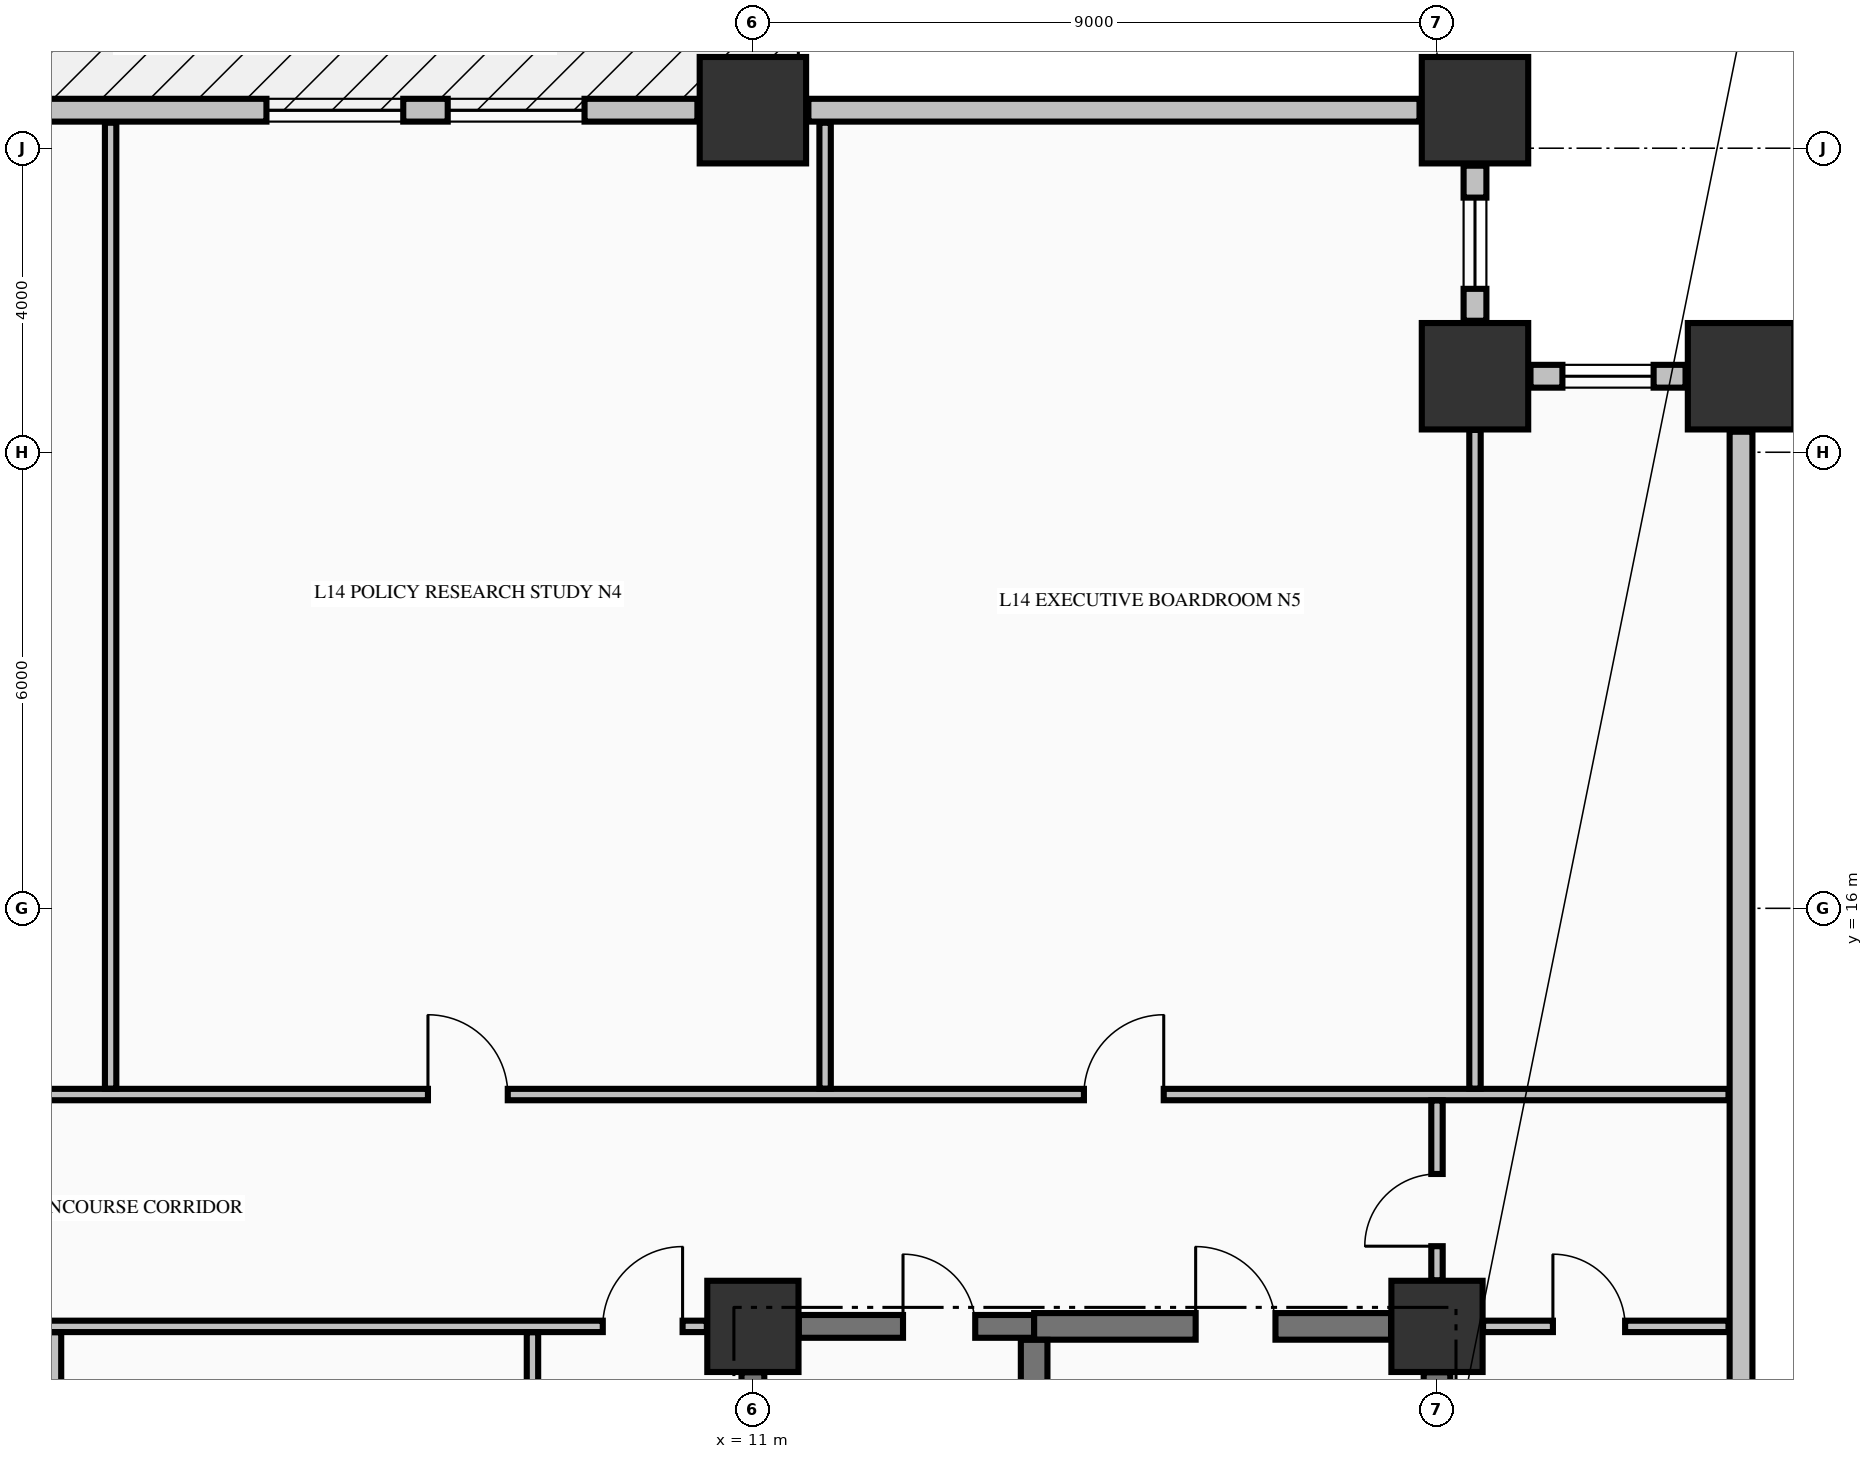
"""IFC4 building model, lengths in metres.
Left out: names, types, materials, properties, quantities, classifications, styles, units other than length and angle.
Written with IfcOpenShell. Run it as: python <this file> out.ifc"""

import sys

from ifc_helpers import new_model, si_unit, direction, frame, frame_2d, origin, origin_2d, place, context, subcontext, project, spatial, rectangle, extrude, element, fill, save


model = new_model("IFC4")
c1 = context("Model", 3, precision=1e-05, world=origin(), true_north=direction((0.0, 1.0)))
c2 = subcontext(c1, "Body", "Model", "MODEL_VIEW")
j1 = project(units=[si_unit("LENGTHUNIT", "METRE"), si_unit("PLANEANGLEUNIT", "RADIAN")], contexts=[c1])
p1 = place(None, origin())
s1 = spatial("IfcSite", under=j1, at=p1, CompositionType="ELEMENT")
p2 = place(p1, origin())
s2 = spatial("IfcBuilding", under=s1, at=p2, CompositionType="ELEMENT")
p3 = place(p2, frame((0.0, 0.0, 60.76)))
s3 = spatial("IfcBuildingStorey", under=s2, at=p3, CompositionType="ELEMENT", Elevation=60.76)
for number, where, z_axis, x_axis in (
    (1, (11.0, 26.5, -0.3), (0.0, 0.0, 1.0), (1.0, 0.0, 0.0)),
    (2, (20.5, 26.5, -0.3), (0.0, 0.0, 1.0), (1.0, 0.0, 0.0)),
    (3, (24.0, 23.0, -0.3), (0.0, 0.0, 1.0), (1.0, 0.0, 0.0)),
    (4, (20.5, 23.0, -0.3), (0.0, 0.0, 1.0), (1.0, 0.0, 0.0)),
):
    element("IfcColumn", number, at=place(p3, frame(where, z_axis=z_axis, x_axis=x_axis)), inside=s3, PredefinedType="COLUMN", context=c2, shape_type="SweptSolid", body=[
        extrude(rectangle(XDim=1.4, YDim=1.4, at=origin_2d()), origin(), (0.0, 0.0, 1.0), 3.62),
    ])
for number, where, z_axis, x_axis in (
    (5, (11.0, 10.5, -0.3), (0.0, 0.0, 1.0), (1.0, 0.0, 0.0)),
    (6, (20.0, 10.5, -0.3), (0.0, 0.0, 1.0), (1.0, 0.0, 0.0)),
):
    element("IfcColumn", number, at=place(p3, frame(where, z_axis=z_axis, x_axis=x_axis)), inside=s3, PredefinedType="COLUMN", context=c2, shape_type="SweptSolid", body=[
        extrude(rectangle(XDim=1.2, YDim=1.2, at=origin_2d()), origin(), (0.0, 0.0, 1.0), 3.62),
    ])
p4 = place(p3, frame((23.27, 23.0, 0.0), z_axis=(0.0, 0.0, 1.0), x_axis=(-1.0, 0.0, 0.0)))
e7 = element("IfcWall", 7, at=p4, inside=s3, PredefinedType="STANDARD", context=c2, shape_type="SweptSolid", body=[
    extrude(rectangle(XDim=2.04, YDim=0.3, at=frame_2d((1.02, 0.0))), origin(), (0.0, 0.0, 1.0), 2.712),
])
p5 = place(p4, frame((0.42, 0.0, 0.82)))
e8 = element("IfcOpeningElement", 8, at=p5, cuts=e7, PredefinedType="OPENING", context=c2, shape_type="SweptSolid", body=[
    extrude(rectangle(XDim=1.2, YDim=1.65, at=frame_2d((0.6, 0.825))), frame((0.0, 0.16, 0.0), z_axis=(0.0, -1.0, 0.0), x_axis=(1.0, 0.0, 0.0)), (0.0, 0.0, 1.0), 0.32),
])
p6 = place(p3, frame((20.5, 23.73, 0.0), z_axis=(0.0, 0.0, 1.0), x_axis=(0.0, 1.0, 0.0)))
e9 = element("IfcWall", 9, at=p6, inside=s3, PredefinedType="STANDARD", context=c2, shape_type="SweptSolid", body=[
    extrude(rectangle(XDim=2.04, YDim=0.3, at=frame_2d((1.02, 0.0))), origin(), (0.0, 0.0, 1.0), 2.712),
])
p7 = place(p6, frame((0.42, 0.0, 0.82)))
e10 = element("IfcOpeningElement", 10, at=p7, cuts=e9, PredefinedType="OPENING", context=c2, shape_type="SweptSolid", body=[
    extrude(rectangle(XDim=1.2, YDim=1.65, at=frame_2d((0.6, 0.825))), frame((0.0, 0.16, 0.0), z_axis=(0.0, -1.0, 0.0), x_axis=(1.0, 0.0, 0.0)), (0.0, 0.0, 1.0), 0.32),
])
p8 = place(p3, frame((10.27, 26.5, 0.0), z_axis=(0.0, 0.0, 1.0), x_axis=(-1.0, 0.0, 0.0)))
e11 = element("IfcWall", 11, at=p8, inside=s3, PredefinedType="STANDARD", context=c2, shape_type="SweptSolid", body=[
    extrude(rectangle(XDim=9.54, YDim=0.3, at=frame_2d((4.77, 0.0))), origin(), (0.0, 0.0, 1.0), 2.712),
])
p9 = place(p8, frame((1.485, 0.0, 0.78)))
e12 = element("IfcOpeningElement", 12, at=p9, cuts=e11, PredefinedType="OPENING", context=c2, shape_type="SweptSolid", body=[
    extrude(rectangle(XDim=1.8, YDim=1.72, at=frame_2d((0.9, 0.86))), frame((0.0, 0.16, 0.0), z_axis=(0.0, -1.0, 0.0), x_axis=(1.0, 0.0, 0.0)), (0.0, 0.0, 1.0), 0.32),
])
p10 = place(p8, frame((3.87, 0.0, 0.78)))
e13 = element("IfcOpeningElement", 13, at=p10, cuts=e11, PredefinedType="OPENING", context=c2, shape_type="SweptSolid", body=[
    extrude(rectangle(XDim=1.8, YDim=1.72, at=frame_2d((0.9, 0.86))), frame((0.0, 0.16, 0.0), z_axis=(0.0, -1.0, 0.0), x_axis=(1.0, 0.0, 0.0)), (0.0, 0.0, 1.0), 0.32),
])
p11 = place(p3, frame((19.77, 26.5, 0.0), z_axis=(0.0, 0.0, 1.0), x_axis=(-1.0, 0.0, 0.0)))
e14 = element("IfcWall", 14, at=p11, inside=s3, PredefinedType="STANDARD", context=c2, shape_type="SweptSolid", body=[
    extrude(rectangle(XDim=8.04, YDim=0.3, at=frame_2d((4.02, 0.0))), origin(), (0.0, 0.0, 1.0), 2.712),
])
p12 = place(p3, frame((24.0, 9.73, 0.0), z_axis=(0.0, 0.0, 1.0), x_axis=(0.0, 1.0, 0.0)))
e15 = element("IfcWall", 15, at=p12, inside=s3, PredefinedType="STANDARD", context=c2, shape_type="SweptSolid", body=[
    extrude(rectangle(XDim=12.54, YDim=0.3, at=frame_2d((6.27, 0.0))), origin(), (0.0, 0.0, 1.0), 2.712),
])
p13 = place(p3, frame((11.604, 10.5, 0.0), z_axis=(0.0, 0.0, 1.0), x_axis=(1.0, 0.0, 0.0)))
e16 = element("IfcWall", 16, at=p13, inside=s3, PredefinedType="SHEAR", context=c2, shape_type="SweptSolid", body=[
    extrude(rectangle(XDim=3.096, YDim=0.3, at=frame_2d((1.548, 0.0))), origin(), (0.0, 0.0, 1.0), 3.32),
])
p14 = place(p13, frame((1.371, 0.0, 0.0)))
e17 = element("IfcOpeningElement", 17, at=p14, cuts=e16, PredefinedType="OPENING", context=c2, shape_type="SweptSolid", body=[
    extrude(rectangle(XDim=0.95, YDim=2.15, at=frame_2d((0.475, 1.075))), frame((0.0, 0.16, 0.0), z_axis=(0.0, -1.0, 0.0), x_axis=(1.0, 0.0, 0.0)), (0.0, 0.0, 1.0), 0.32),
])
p15 = place(p3, frame((14.7, 10.5, 0.0), z_axis=(0.0, 0.0, 1.0), x_axis=(1.0, 0.0, 0.0)))
e18 = element("IfcWall", 18, at=p15, inside=s3, PredefinedType="SHEAR", context=c2, shape_type="SweptSolid", body=[
    extrude(rectangle(XDim=4.696, YDim=0.35, at=frame_2d((2.348, 0.0))), origin(), (0.0, 0.0, 1.0), 3.32),
])
p16 = place(p15, frame((2.125, 0.0, 0.0)))
e19 = element("IfcOpeningElement", 19, at=p16, cuts=e18, PredefinedType="OPENING", context=c2, shape_type="SweptSolid", body=[
    extrude(rectangle(XDim=1.05, YDim=2.15, at=frame_2d((0.525, 1.075))), frame((0.0, 0.185, 0.0), z_axis=(0.0, -1.0, 0.0), x_axis=(1.0, 0.0, 0.0)), (0.0, 0.0, 1.0), 0.37),
])
p17 = place(p3, frame((-10.394, 10.5, 0.0), z_axis=(0.0, 0.0, 1.0), x_axis=(1.0, 0.0, 0.0)))
e20 = element("IfcWall", 20, at=p17, inside=s3, PredefinedType="PARTITIONING", context=c2, shape_type="SweptSolid", body=[
    extrude(rectangle(XDim=20.788, YDim=0.15, at=frame_2d((10.394, 0.0))), origin(), (0.0, 0.0, 1.0), 3.32),
])
p18 = place(p17, frame((0.319, 0.0, 0.0)))
e21 = element("IfcOpeningElement", 21, at=p18, cuts=e20, PredefinedType="OPENING", context=c2, shape_type="SweptSolid", body=[
    extrude(rectangle(XDim=1.05, YDim=2.15, at=frame_2d((0.525, 1.075))), frame((0.0, 0.085, 0.0), z_axis=(0.0, -1.0, 0.0), x_axis=(1.0, 0.0, 0.0)), (0.0, 0.0, 1.0), 0.17),
])
p19 = place(p17, frame((19.419, 0.0, 0.0)))
e22 = element("IfcOpeningElement", 22, at=p19, cuts=e20, PredefinedType="OPENING", context=c2, shape_type="SweptSolid", body=[
    extrude(rectangle(XDim=1.05, YDim=2.15, at=frame_2d((0.525, 1.075))), frame((0.0, 0.085, 0.0), z_axis=(0.0, -1.0, 0.0), x_axis=(1.0, 0.0, 0.0)), (0.0, 0.0, 1.0), 0.17),
])
p20 = place(p3, frame((20.606, 10.5, 0.0), z_axis=(0.0, 0.0, 1.0), x_axis=(1.0, 0.0, 0.0)))
e23 = element("IfcWall", 23, at=p20, inside=s3, PredefinedType="PARTITIONING", context=c2, shape_type="SweptSolid", body=[
    extrude(rectangle(XDim=3.229, YDim=0.15, at=frame_2d((1.615, 0.0))), origin(), (0.0, 0.0, 1.0), 3.32),
])
p21 = place(p20, frame((0.919, 0.0, 0.0)))
e24 = element("IfcOpeningElement", 24, at=p21, cuts=e23, PredefinedType="OPENING", context=c2, shape_type="SweptSolid", body=[
    extrude(rectangle(XDim=0.95, YDim=2.15, at=frame_2d((0.475, 1.075))), frame((0.0, 0.085, 0.0), z_axis=(0.0, -1.0, 0.0), x_axis=(1.0, 0.0, 0.0)), (0.0, 0.0, 1.0), 0.17),
])
p22 = place(p3, frame((-28.835, 13.55, 0.0), z_axis=(0.0, 0.0, 1.0), x_axis=(1.0, 0.0, 0.0)))
e25 = element("IfcWall", 25, at=p22, inside=s3, PredefinedType="PARTITIONING", context=c2, shape_type="SweptSolid", body=[
    extrude(rectangle(XDim=52.67, YDim=0.15, at=frame_2d((26.335, 0.0))), origin(), (0.0, 0.0, 1.0), 3.32),
])
p23 = place(p22, frame((11.38, 0.0, 0.0)))
e26 = element("IfcOpeningElement", 26, at=p23, cuts=e25, PredefinedType="OPENING", context=c2, shape_type="SweptSolid", body=[
    extrude(rectangle(XDim=1.05, YDim=2.15, at=frame_2d((0.525, 1.075))), frame((0.0, 0.085, 0.0), z_axis=(0.0, -1.0, 0.0), x_axis=(1.0, 0.0, 0.0)), (0.0, 0.0, 1.0), 0.17),
])
p24 = place(p22, frame((15.91, 0.0, 0.0)))
e27 = element("IfcOpeningElement", 27, at=p24, cuts=e25, PredefinedType="OPENING", context=c2, shape_type="SweptSolid", body=[
    extrude(rectangle(XDim=1.05, YDim=2.15, at=frame_2d((0.525, 1.075))), frame((0.0, 0.085, 0.0), z_axis=(0.0, -1.0, 0.0), x_axis=(1.0, 0.0, 0.0)), (0.0, 0.0, 1.0), 0.17),
])
p25 = place(p22, frame((26.66, 0.0, 0.0)))
e28 = element("IfcOpeningElement", 28, at=p25, cuts=e25, PredefinedType="OPENING", context=c2, shape_type="SweptSolid", body=[
    extrude(rectangle(XDim=1.05, YDim=2.15, at=frame_2d((0.525, 1.075))), frame((0.0, 0.085, 0.0), z_axis=(0.0, -1.0, 0.0), x_axis=(1.0, 0.0, 0.0)), (0.0, 0.0, 1.0), 0.17),
])
p26 = place(p22, frame((35.56, 0.0, 0.0)))
e29 = element("IfcOpeningElement", 29, at=p26, cuts=e25, PredefinedType="OPENING", context=c2, shape_type="SweptSolid", body=[
    extrude(rectangle(XDim=1.05, YDim=2.15, at=frame_2d((0.525, 1.075))), frame((0.0, 0.085, 0.0), z_axis=(0.0, -1.0, 0.0), x_axis=(1.0, 0.0, 0.0)), (0.0, 0.0, 1.0), 0.17),
])
p27 = place(p22, frame((44.19, 0.0, 0.0)))
e30 = element("IfcOpeningElement", 30, at=p27, cuts=e25, PredefinedType="OPENING", context=c2, shape_type="SweptSolid", body=[
    extrude(rectangle(XDim=1.05, YDim=2.15, at=frame_2d((0.525, 1.075))), frame((0.0, 0.085, 0.0), z_axis=(0.0, -1.0, 0.0), x_axis=(1.0, 0.0, 0.0)), (0.0, 0.0, 1.0), 0.17),
])
p28 = place(p3, frame((11.0, 5.852, 0.0), z_axis=(0.0, 0.0, 1.0), x_axis=(0.0, 1.0, 0.0)))
e31 = element("IfcWall", 31, at=p28, inside=s3, PredefinedType="SHEAR", context=c2, shape_type="SweptSolid", body=[
    extrude(rectangle(XDim=4.044, YDim=0.3, at=frame_2d((2.022, 0.0))), origin(), (0.0, 0.0, 1.0), 3.32),
])
p29 = place(p3, frame((14.7, 5.852, 0.0), z_axis=(0.0, 0.0, 1.0), x_axis=(0.0, 1.0, 0.0)))
e32 = element("IfcWall", 32, at=p29, inside=s3, PredefinedType="SHEAR", context=c2, shape_type="SweptSolid", body=[
    extrude(rectangle(XDim=4.471, YDim=0.35, at=frame_2d((2.235, 0.0))), origin(), (0.0, 0.0, 1.0), 3.32),
])
p30 = place(p3, frame((20.0, 0.604, 0.0), z_axis=(0.0, 0.0, 1.0), x_axis=(0.0, 1.0, 0.0)))
e33 = element("IfcWall", 33, at=p30, inside=s3, PredefinedType="SHEAR", context=c2, shape_type="SweptSolid", body=[
    extrude(rectangle(XDim=9.292, YDim=0.35, at=frame_2d((4.646, 0.0))), origin(), (0.0, 0.0, 1.0), 3.32),
])
p31 = place(p3, frame((1.8, 0.303, 0.0), z_axis=(0.0, 0.0, 1.0), x_axis=(0.0, 1.0, 0.0)))
e34 = element("IfcWall", 34, at=p31, inside=s3, PredefinedType="PARTITIONING", context=c2, shape_type="SweptSolid", body=[
    extrude(rectangle(XDim=10.119, YDim=0.2, at=frame_2d((5.06, 0.0))), origin(), (0.0, 0.0, 1.0), 3.32),
])
p32 = place(p3, frame((2.55, 13.628, 0.0), z_axis=(0.0, 0.0, 1.0), x_axis=(0.0, 1.0, 0.0)))
e35 = element("IfcWall", 35, at=p32, inside=s3, PredefinedType="PARTITIONING", context=c2, shape_type="SweptSolid", body=[
    extrude(rectangle(XDim=12.707, YDim=0.15, at=frame_2d((6.354, 0.0))), origin(), (0.0, 0.0, 1.0), 3.32),
])
p33 = place(p3, frame((8.1, 0.303, 0.0), z_axis=(0.0, 0.0, 1.0), x_axis=(0.0, 1.0, 0.0)))
e36 = element("IfcWall", 36, at=p33, inside=s3, PredefinedType="PARTITIONING", context=c2, shape_type="SweptSolid", body=[
    extrude(rectangle(XDim=10.119, YDim=0.15, at=frame_2d((5.06, 0.0))), origin(), (0.0, 0.0, 1.0), 3.32),
])
p34 = place(p33, frame((4.497, 0.0, 0.0)))
e37 = element("IfcOpeningElement", 37, at=p34, cuts=e36, PredefinedType="OPENING", context=c2, shape_type="SweptSolid", body=[
    extrude(rectangle(XDim=1.1, YDim=2.15, at=frame_2d((0.55, 1.075))), frame((0.0, 0.085, 0.0), z_axis=(0.0, -1.0, 0.0), x_axis=(1.0, 0.0, 0.0)), (0.0, 0.0, 1.0), 0.17),
])
p35 = place(p3, frame((11.95, 13.628, 0.0), z_axis=(0.0, 0.0, 1.0), x_axis=(0.0, 1.0, 0.0)))
e38 = element("IfcWall", 38, at=p35, inside=s3, PredefinedType="PARTITIONING", context=c2, shape_type="SweptSolid", body=[
    extrude(rectangle(XDim=12.707, YDim=0.15, at=frame_2d((6.354, 0.0))), origin(), (0.0, 0.0, 1.0), 3.32),
])
p36 = place(p3, frame((20.0, 11.106, 0.0), z_axis=(0.0, 0.0, 1.0), x_axis=(0.0, 1.0, 0.0)))
e39 = element("IfcWall", 39, at=p36, inside=s3, PredefinedType="PARTITIONING", context=c2, shape_type="SweptSolid", body=[
    extrude(rectangle(XDim=2.366, YDim=0.15, at=frame_2d((1.183, 0.0))), origin(), (0.0, 0.0, 1.0), 3.32),
])
p37 = place(p36, frame((0.449, 0.0, 0.0)))
e40 = element("IfcOpeningElement", 40, at=p37, cuts=e39, PredefinedType="OPENING", context=c2, shape_type="SweptSolid", body=[
    extrude(rectangle(XDim=0.95, YDim=2.15, at=frame_2d((0.475, 1.075))), frame((0.0, 0.085, 0.0), z_axis=(0.0, -1.0, 0.0), x_axis=(1.0, 0.0, 0.0)), (0.0, 0.0, 1.0), 0.17),
])
p38 = place(p3, frame((20.5, 13.628, 0.0), z_axis=(0.0, 0.0, 1.0), x_axis=(0.0, 1.0, 0.0)))
e41 = element("IfcWall", 41, at=p38, inside=s3, PredefinedType="PARTITIONING", context=c2, shape_type="SweptSolid", body=[
    extrude(rectangle(XDim=8.666, YDim=0.15, at=frame_2d((4.333, 0.0))), origin(), (0.0, 0.0, 1.0), 3.32),
])
p39 = place(p5, origin())
e42 = element("IfcWindow", 42, at=p39, inside=s3, PartitioningType="SINGLE_PANEL", PredefinedType="WINDOW", context=c2, shape_type="SweptSolid", body=[
    extrude(rectangle(XDim=1.2, YDim=1.65, at=frame_2d((0.6, 0.825))), frame((0.0, 0.03, 0.0), z_axis=(0.0, -1.0, 0.0), x_axis=(1.0, 0.0, 0.0)), (0.0, 0.0, 1.0), 0.06),
])
fill(e8, e42)
p40 = place(p7, origin())
e43 = element("IfcWindow", 43, at=p40, inside=s3, PartitioningType="SINGLE_PANEL", PredefinedType="WINDOW", context=c2, shape_type="SweptSolid", body=[
    extrude(rectangle(XDim=1.2, YDim=1.65, at=frame_2d((0.6, 0.825))), frame((0.0, 0.03, 0.0), z_axis=(0.0, -1.0, 0.0), x_axis=(1.0, 0.0, 0.0)), (0.0, 0.0, 1.0), 0.06),
])
fill(e10, e43)
p41 = place(p9, origin())
e44 = element("IfcWindow", 44, at=p41, inside=s3, PartitioningType="SINGLE_PANEL", PredefinedType="WINDOW", context=c2, shape_type="SweptSolid", body=[
    extrude(rectangle(XDim=1.8, YDim=1.72, at=frame_2d((0.9, 0.86))), frame((0.0, 0.03, 0.0), z_axis=(0.0, -1.0, 0.0), x_axis=(1.0, 0.0, 0.0)), (0.0, 0.0, 1.0), 0.06),
])
fill(e12, e44)
p42 = place(p10, origin())
e45 = element("IfcWindow", 45, at=p42, inside=s3, PartitioningType="SINGLE_PANEL", PredefinedType="WINDOW", context=c2, shape_type="SweptSolid", body=[
    extrude(rectangle(XDim=1.8, YDim=1.72, at=frame_2d((0.9, 0.86))), frame((0.0, 0.03, 0.0), z_axis=(0.0, -1.0, 0.0), x_axis=(1.0, 0.0, 0.0)), (0.0, 0.0, 1.0), 0.06),
])
fill(e13, e45)
p43 = place(p14, origin())
e46 = element("IfcDoor", 46, at=p43, inside=s3, OperationType="SINGLE_SWING_LEFT", PredefinedType="DOOR", context=c2, shape_type="SweptSolid", body=[
    extrude(rectangle(XDim=0.95, YDim=2.15, at=frame_2d((0.475, 1.075))), frame((0.0, 0.025, 0.0), z_axis=(0.0, -1.0, 0.0), x_axis=(1.0, 0.0, 0.0)), (0.0, 0.0, 1.0), 0.05),
])
fill(e17, e46)
p44 = place(p16, origin())
e47 = element("IfcDoor", 47, at=p44, inside=s3, OperationType="SINGLE_SWING_LEFT", PredefinedType="DOOR", context=c2, shape_type="SweptSolid", body=[
    extrude(rectangle(XDim=1.05, YDim=2.15, at=frame_2d((0.525, 1.075))), frame((0.0, 0.025, 0.0), z_axis=(0.0, -1.0, 0.0), x_axis=(1.0, 0.0, 0.0)), (0.0, 0.0, 1.0), 0.05),
])
fill(e19, e47)
p45 = place(p19, origin())
e48 = element("IfcDoor", 48, at=p45, inside=s3, OperationType="SINGLE_SWING_RIGHT", PredefinedType="DOOR", context=c2, shape_type="SweptSolid", body=[
    extrude(rectangle(XDim=1.05, YDim=2.15, at=frame_2d((0.525, 1.075))), frame((0.0, 0.025, 0.0), z_axis=(0.0, -1.0, 0.0), x_axis=(1.0, 0.0, 0.0)), (0.0, 0.0, 1.0), 0.05),
])
fill(e22, e48)
p46 = place(p26, origin())
e49 = element("IfcDoor", 49, at=p46, inside=s3, OperationType="SINGLE_SWING_LEFT", PredefinedType="DOOR", context=c2, shape_type="SweptSolid", body=[
    extrude(rectangle(XDim=1.05, YDim=2.15, at=frame_2d((0.525, 1.075))), frame((0.0, 0.025, 0.0), z_axis=(0.0, -1.0, 0.0), x_axis=(1.0, 0.0, 0.0)), (0.0, 0.0, 1.0), 0.05),
])
fill(e29, e49)
p47 = place(p27, origin())
e50 = element("IfcDoor", 50, at=p47, inside=s3, OperationType="SINGLE_SWING_RIGHT", PredefinedType="DOOR", context=c2, shape_type="SweptSolid", body=[
    extrude(rectangle(XDim=1.05, YDim=2.15, at=frame_2d((0.525, 1.075))), frame((0.0, 0.025, 0.0), z_axis=(0.0, -1.0, 0.0), x_axis=(1.0, 0.0, 0.0)), (0.0, 0.0, 1.0), 0.05),
])
fill(e30, e50)
p48 = place(p37, origin())
e51 = element("IfcDoor", 51, at=p48, inside=s3, OperationType="SINGLE_SWING_LEFT", PredefinedType="DOOR", context=c2, shape_type="SweptSolid", body=[
    extrude(rectangle(XDim=0.95, YDim=2.15, at=frame_2d((0.475, 1.075))), frame((0.0, 0.025, 0.0), z_axis=(0.0, -1.0, 0.0), x_axis=(1.0, 0.0, 0.0)), (0.0, 0.0, 1.0), 0.05),
])
fill(e40, e51)
p49 = place(p21, origin())
e52 = element("IfcDoor", 52, at=p49, inside=s3, OperationType="SINGLE_SWING_LEFT", PredefinedType="DOOR", context=c2, shape_type="SweptSolid", body=[
    extrude(rectangle(XDim=0.95, YDim=2.15, at=frame_2d((0.475, 1.075))), frame((0.0, 0.025, 0.0), z_axis=(0.0, -1.0, 0.0), x_axis=(1.0, 0.0, 0.0)), (0.0, 0.0, 1.0), 0.05),
])
fill(e24, e52)
save(model, sys.argv[1])
